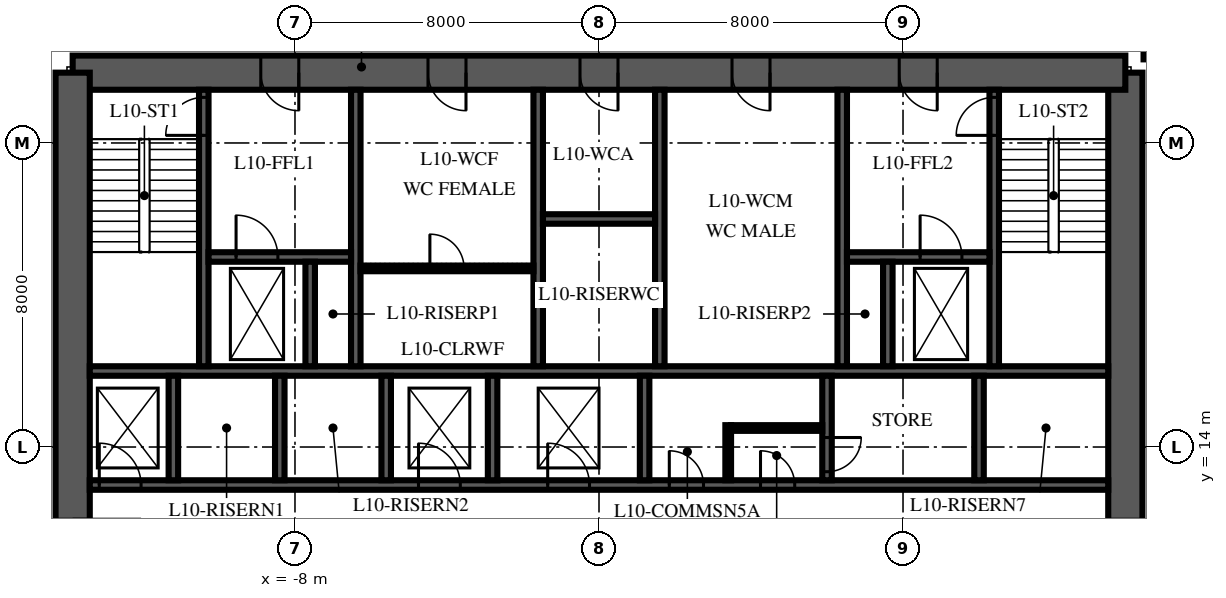
"""IFC4 building model, lengths in metres.
Left out: names, types, materials, properties, quantities, classifications, styles, units other than length and angle.
Written with IfcOpenShell. Run it as: python <this file> out.ifc"""

import sys

from ifc_helpers import new_model, si_unit, direction, frame, frame_2d, origin, place, context, subcontext, project, spatial, polyline, rectangle, outline, extrude, element, fill, save


model = new_model("IFC4")
c1 = context("Model", 3, precision=1e-05, world=origin(), true_north=direction((0.0, 1.0)))
c2 = subcontext(c1, "Body", "Model", "MODEL_VIEW")
j1 = project(units=[si_unit("LENGTHUNIT", "METRE"), si_unit("PLANEANGLEUNIT", "RADIAN")], contexts=[c1])
p1 = place(None, origin())
s1 = spatial("IfcSite", under=j1, at=p1, CompositionType="ELEMENT")
p2 = place(p1, origin())
s2 = spatial("IfcBuilding", under=s1, at=p2, CompositionType="ELEMENT")
p3 = place(p2, frame((0.0, 0.0, 52.0)))
s3 = spatial("IfcBuildingStorey", under=s2, at=p3, CompositionType="ELEMENT", Elevation=52.0)
p4 = place(p3, frame((13.85, 6.15, 0.0), z_axis=(0.0, 0.0, 1.0), x_axis=(0.0, 1.0, 0.0)))
e1 = element("IfcWall", 1, at=p4, inside=s3, PredefinedType="SHEAR", context=c2, shape_type="SweptSolid", body=[
    extrude(outline(polyline([(0.0, -0.45), (17.7, -0.45), (17.7, 0.0), (17.25, 0.0), (17.25, 0.45), (0.45, 0.45), (0.45, 0.0), (0.0, 0.0), (0.0, -0.45)])), origin(), (0.0, 0.0, 1.0), 4.0),
])
p5 = place(p4, frame((4.15, 0.0, 0.0)))
e2 = element("IfcOpeningElement", 2, at=p5, cuts=e1, PredefinedType="OPENING", context=c2, shape_type="SweptSolid", body=[
    extrude(rectangle(XDim=1.8, YDim=2.4, at=frame_2d((0.9, 1.2))), frame((0.0, 0.465, 0.0), z_axis=(0.0, -1.0, 0.0), x_axis=(1.0, 0.0, 0.0)), (0.0, 0.0, 1.0), 0.93),
])
p6 = place(p3, frame((13.85, 23.85, 0.0), z_axis=(0.0, 0.0, 1.0), x_axis=(-1.0, 0.0, 0.0)))
e3 = element("IfcWall", 3, at=p6, inside=s3, PredefinedType="SHEAR", context=c2, shape_type="SweptSolid", body=[
    extrude(rectangle(XDim=27.7, YDim=0.9, at=frame_2d((13.85, 0.0))), origin(), (0.0, 0.0, 1.0), 4.0),
])
p7 = place(p6, frame((21.75, 0.0, 0.0)))
e4 = element("IfcOpeningElement", 4, at=p7, cuts=e3, PredefinedType="OPENING", context=c2, shape_type="SweptSolid", body=[
    extrude(rectangle(XDim=1.0, YDim=2.1, at=frame_2d((0.5, 1.05))), frame((0.0, 0.465, 0.0), z_axis=(0.0, -1.0, 0.0), x_axis=(1.0, 0.0, 0.0)), (0.0, 0.0, 1.0), 0.93),
])
p8 = place(p6, frame((4.95, 0.0, 0.0)))
e5 = element("IfcOpeningElement", 5, at=p8, cuts=e3, PredefinedType="OPENING", context=c2, shape_type="SweptSolid", body=[
    extrude(rectangle(XDim=1.0, YDim=2.1, at=frame_2d((0.5, 1.05))), frame((0.0, 0.465, 0.0), z_axis=(0.0, -1.0, 0.0), x_axis=(1.0, 0.0, 0.0)), (0.0, 0.0, 1.0), 0.93),
])
p9 = place(p6, frame((17.35, 0.0, 0.0)))
e6 = element("IfcOpeningElement", 6, at=p9, cuts=e3, PredefinedType="OPENING", context=c2, shape_type="SweptSolid", body=[
    extrude(rectangle(XDim=1.0, YDim=2.1, at=frame_2d((0.5, 1.05))), frame((0.0, 0.465, 0.0), z_axis=(0.0, -1.0, 0.0), x_axis=(1.0, 0.0, 0.0)), (0.0, 0.0, 1.0), 0.93),
])
p10 = place(p6, frame((13.35, 0.0, 0.0)))
e7 = element("IfcOpeningElement", 7, at=p10, cuts=e3, PredefinedType="OPENING", context=c2, shape_type="SweptSolid", body=[
    extrude(rectangle(XDim=1.0, YDim=2.1, at=frame_2d((0.5, 1.05))), frame((0.0, 0.465, 0.0), z_axis=(0.0, -1.0, 0.0), x_axis=(1.0, 0.0, 0.0)), (0.0, 0.0, 1.0), 0.93),
])
p11 = place(p6, frame((9.35, 0.0, 0.0)))
e8 = element("IfcOpeningElement", 8, at=p11, cuts=e3, PredefinedType="OPENING", context=c2, shape_type="SweptSolid", body=[
    extrude(rectangle(XDim=1.0, YDim=2.1, at=frame_2d((0.5, 1.05))), frame((0.0, 0.465, 0.0), z_axis=(0.0, -1.0, 0.0), x_axis=(1.0, 0.0, 0.0)), (0.0, 0.0, 1.0), 0.93),
])
p12 = place(p3, frame((-13.85, 23.85, 0.0), z_axis=(0.0, 0.0, 1.0), x_axis=(0.0, -1.0, 0.0)))
e9 = element("IfcWall", 9, at=p12, inside=s3, PredefinedType="SHEAR", context=c2, shape_type="SweptSolid", body=[
    extrude(outline(polyline([(0.0, -0.45), (17.7, -0.45), (17.7, 0.0), (17.25, 0.0), (17.25, 0.45), (0.45, 0.45), (0.45, 0.0), (0.0, 0.0), (0.0, -0.45)])), origin(), (0.0, 0.0, 1.0), 4.0),
])
p13 = place(p12, frame((11.75, 0.0, 0.0)))
e10 = element("IfcOpeningElement", 10, at=p13, cuts=e9, PredefinedType="OPENING", context=c2, shape_type="SweptSolid", body=[
    extrude(rectangle(XDim=1.8, YDim=2.4, at=frame_2d((0.9, 1.2))), frame((0.0, 0.465, 0.0), z_axis=(0.0, -1.0, 0.0), x_axis=(1.0, 0.0, 0.0)), (0.0, 0.0, 1.0), 0.93),
])
p14 = place(p3, frame((-13.4, 13.0, 0.0), z_axis=(0.0, 0.0, 1.0), x_axis=(1.0, 0.0, 0.0)))
e11 = element("IfcWall", 11, at=p14, inside=s3, PredefinedType="SHEAR", context=c2, shape_type="SweptSolid", body=[
    extrude(rectangle(XDim=26.8, YDim=0.25, at=frame_2d((13.4, 0.0))), origin(), (0.0, 0.0, 1.0), 4.0),
])
p15 = place(p14, frame((0.25, 0.0, 0.0)))
e12 = element("IfcOpeningElement", 12, at=p15, cuts=e11, PredefinedType="OPENING", context=c2, shape_type="SweptSolid", body=[
    extrude(rectangle(XDim=1.1, YDim=2.1, at=frame_2d((0.55, 1.05))), frame((0.0, 0.14, 0.0), z_axis=(0.0, -1.0, 0.0), x_axis=(1.0, 0.0, 0.0)), (0.0, 0.0, 1.0), 0.28),
])
p16 = place(p14, frame((8.65, 0.0, 0.0)))
e13 = element("IfcOpeningElement", 13, at=p16, cuts=e11, PredefinedType="OPENING", context=c2, shape_type="SweptSolid", body=[
    extrude(rectangle(XDim=1.1, YDim=2.1, at=frame_2d((0.55, 1.05))), frame((0.0, 0.14, 0.0), z_axis=(0.0, -1.0, 0.0), x_axis=(1.0, 0.0, 0.0)), (0.0, 0.0, 1.0), 0.28),
])
p17 = place(p14, frame((12.05, 0.0, 0.0)))
e14 = element("IfcOpeningElement", 14, at=p17, cuts=e11, PredefinedType="OPENING", context=c2, shape_type="SweptSolid", body=[
    extrude(rectangle(XDim=1.1, YDim=2.1, at=frame_2d((0.55, 1.05))), frame((0.0, 0.14, 0.0), z_axis=(0.0, -1.0, 0.0), x_axis=(1.0, 0.0, 0.0)), (0.0, 0.0, 1.0), 0.28),
])
p18 = place(p14, frame((15.25, 0.0, 0.0)))
e15 = element("IfcOpeningElement", 15, at=p18, cuts=e11, PredefinedType="OPENING", context=c2, shape_type="SweptSolid", body=[
    extrude(rectangle(XDim=0.9, YDim=2.1, at=frame_2d((0.45, 1.05))), frame((0.0, 0.14, 0.0), z_axis=(0.0, -1.0, 0.0), x_axis=(1.0, 0.0, 0.0)), (0.0, 0.0, 1.0), 0.28),
])
p19 = place(p14, frame((17.65, 0.0, 0.0)))
e16 = element("IfcOpeningElement", 16, at=p19, cuts=e11, PredefinedType="OPENING", context=c2, shape_type="SweptSolid", body=[
    extrude(rectangle(XDim=0.9, YDim=2.1, at=frame_2d((0.45, 1.05))), frame((0.0, 0.14, 0.0), z_axis=(0.0, -1.0, 0.0), x_axis=(1.0, 0.0, 0.0)), (0.0, 0.0, 1.0), 0.28),
])
p20 = place(p3, frame((-13.4, 16.0, 0.0), z_axis=(0.0, 0.0, 1.0), x_axis=(1.0, 0.0, 0.0)))
e17 = element("IfcWall", 17, at=p20, inside=s3, PredefinedType="SHEAR", context=c2, shape_type="SweptSolid", body=[
    extrude(rectangle(XDim=26.8, YDim=0.25, at=frame_2d((13.4, 0.0))), origin(), (0.0, 0.0, 1.0), 4.0),
])
for number, where, z_axis, x_axis in (
    (18, (-11.2, 13.125, 0.0), (0.0, 0.0, 1.0), (0.0, 1.0, 0.0)),
    (19, (-8.4, 13.125, 0.0), (0.0, 0.0, 1.0), (0.0, 1.0, 0.0)),
    (20, (-5.6, 13.125, 0.0), (0.0, 0.0, 1.0), (0.0, 1.0, 0.0)),
    (21, (-2.8, 13.125, 0.0), (0.0, 0.0, 1.0), (0.0, 1.0, 0.0)),
    (22, (1.2, 13.125, 0.0), (0.0, 0.0, 1.0), (0.0, 1.0, 0.0)),
):
    element("IfcWall", number, at=place(p3, frame(where, z_axis=z_axis, x_axis=x_axis)), inside=s3, PredefinedType="SHEAR", context=c2, shape_type="SweptSolid", body=[
        extrude(rectangle(XDim=2.75, YDim=0.25, at=frame_2d((1.375, 0.0))), origin(), (0.0, 0.0, 1.0), 4.0),
    ])
p21 = place(p3, frame((6.0, 13.125, 0.0), z_axis=(0.0, 0.0, 1.0), x_axis=(0.0, 1.0, 0.0)))
e23 = element("IfcWall", 23, at=p21, inside=s3, PredefinedType="SHEAR", context=c2, shape_type="SweptSolid", body=[
    extrude(rectangle(XDim=2.75, YDim=0.25, at=frame_2d((1.375, 0.0))), origin(), (0.0, 0.0, 1.0), 4.0),
])
p22 = place(p21, frame((0.225, 0.0, 0.0)))
e24 = element("IfcOpeningElement", 24, at=p22, cuts=e23, PredefinedType="OPENING", context=c2, shape_type="SweptSolid", body=[
    extrude(rectangle(XDim=0.9, YDim=2.1, at=frame_2d((0.45, 1.05))), frame((0.0, 0.14, 0.0), z_axis=(0.0, -1.0, 0.0), x_axis=(1.0, 0.0, 0.0)), (0.0, 0.0, 1.0), 0.28),
])
p23 = place(p3, frame((10.0, 13.125, 0.0), z_axis=(0.0, 0.0, 1.0), x_axis=(0.0, 1.0, 0.0)))
e25 = element("IfcWall", 25, at=p23, inside=s3, PredefinedType="SHEAR", context=c2, shape_type="SweptSolid", body=[
    extrude(rectangle(XDim=2.75, YDim=0.25, at=frame_2d((1.375, 0.0))), origin(), (0.0, 0.0, 1.0), 4.0),
])
p24 = place(p3, frame((-10.4, 16.125, 0.0), z_axis=(0.0, 0.0, 1.0), x_axis=(0.0, 1.0, 0.0)))
e26 = element("IfcWall", 26, at=p24, inside=s3, PredefinedType="SHEAR", context=c2, shape_type="SweptSolid", body=[
    extrude(rectangle(XDim=7.275, YDim=0.25, at=frame_2d((3.637, 0.0))), origin(), (0.0, 0.0, 1.0), 4.0),
])
p25 = place(p24, frame((6.075, 0.0, 0.0)))
e27 = element("IfcOpeningElement", 27, at=p25, cuts=e26, PredefinedType="OPENING", context=c2, shape_type="SweptSolid", body=[
    extrude(rectangle(XDim=1.0, YDim=2.1, at=frame_2d((0.5, 1.05))), frame((0.0, 0.14, 0.0), z_axis=(0.0, -1.0, 0.0), x_axis=(1.0, 0.0, 0.0)), (0.0, 0.0, 1.0), 0.28),
])
for number, where, z_axis, x_axis in (
    (28, (-6.4, 16.125, 0.0), (0.0, 0.0, 1.0), (0.0, 1.0, 0.0)),
    (29, (-1.6, 16.125, 0.0), (0.0, 0.0, 1.0), (0.0, 1.0, 0.0)),
    (30, (1.6, 16.125, 0.0), (0.0, 0.0, 1.0), (0.0, 1.0, 0.0)),
    (31, (6.4, 16.125, 0.0), (0.0, 0.0, 1.0), (0.0, 1.0, 0.0)),
):
    element("IfcWall", number, at=place(p3, frame(where, z_axis=z_axis, x_axis=x_axis)), inside=s3, PredefinedType="SHEAR", context=c2, shape_type="SweptSolid", body=[
        extrude(rectangle(XDim=7.275, YDim=0.25, at=frame_2d((3.637, 0.0))), origin(), (0.0, 0.0, 1.0), 4.0),
    ])
p26 = place(p3, frame((10.4, 16.125, 0.0), z_axis=(0.0, 0.0, 1.0), x_axis=(0.0, 1.0, 0.0)))
e32 = element("IfcWall", 32, at=p26, inside=s3, PredefinedType="SHEAR", context=c2, shape_type="SweptSolid", body=[
    extrude(rectangle(XDim=7.275, YDim=0.25, at=frame_2d((3.637, 0.0))), origin(), (0.0, 0.0, 1.0), 4.0),
])
p27 = place(p26, frame((6.075, 0.0, 0.0)))
e33 = element("IfcOpeningElement", 33, at=p27, cuts=e32, PredefinedType="OPENING", context=c2, shape_type="SweptSolid", body=[
    extrude(rectangle(XDim=1.0, YDim=2.1, at=frame_2d((0.5, 1.05))), frame((0.0, 0.14, 0.0), z_axis=(0.0, -1.0, 0.0), x_axis=(1.0, 0.0, 0.0)), (0.0, 0.0, 1.0), 0.28),
])
p28 = place(p3, frame((-10.275, 19.0, 0.0), z_axis=(0.0, 0.0, 1.0), x_axis=(1.0, 0.0, 0.0)))
e34 = element("IfcWall", 34, at=p28, inside=s3, PredefinedType="SHEAR", context=c2, shape_type="SweptSolid", body=[
    extrude(rectangle(XDim=3.75, YDim=0.25, at=frame_2d((1.875, 0.0))), origin(), (0.0, 0.0, 1.0), 4.0),
])
p29 = place(p28, frame((0.725, 0.0, 0.0)))
e35 = element("IfcOpeningElement", 35, at=p29, cuts=e34, PredefinedType="OPENING", context=c2, shape_type="SweptSolid", body=[
    extrude(rectangle(XDim=1.1, YDim=2.1, at=frame_2d((0.55, 1.05))), frame((0.0, 0.14, 0.0), z_axis=(0.0, -1.0, 0.0), x_axis=(1.0, 0.0, 0.0)), (0.0, 0.0, 1.0), 0.28),
])
p30 = place(p3, frame((6.525, 19.0, 0.0), z_axis=(0.0, 0.0, 1.0), x_axis=(1.0, 0.0, 0.0)))
e36 = element("IfcWall", 36, at=p30, inside=s3, PredefinedType="SHEAR", context=c2, shape_type="SweptSolid", body=[
    extrude(rectangle(XDim=3.75, YDim=0.25, at=frame_2d((1.875, 0.0))), origin(), (0.0, 0.0, 1.0), 4.0),
])
p31 = place(p30, frame((1.925, 0.0, 0.0)))
e37 = element("IfcOpeningElement", 37, at=p31, cuts=e36, PredefinedType="OPENING", context=c2, shape_type="SweptSolid", body=[
    extrude(rectangle(XDim=1.1, YDim=2.1, at=frame_2d((0.55, 1.05))), frame((0.0, 0.14, 0.0), z_axis=(0.0, -1.0, 0.0), x_axis=(1.0, 0.0, 0.0)), (0.0, 0.0, 1.0), 0.28),
])
for number, where, z_axis, x_axis in (
    (38, (-7.6, 16.125, 0.0), (0.0, 0.0, 1.0), (0.0, 1.0, 0.0)),
    (39, (7.6, 16.125, 0.0), (0.0, 0.0, 1.0), (0.0, 1.0, 0.0)),
):
    element("IfcWall", number, at=place(p3, frame(where, z_axis=z_axis, x_axis=x_axis)), inside=s3, PredefinedType="SHEAR", context=c2, shape_type="SweptSolid", body=[
        extrude(rectangle(XDim=2.75, YDim=0.25, at=frame_2d((1.375, 0.0))), origin(), (0.0, 0.0, 1.0), 4.0),
    ])
p32 = place(p3, frame((-1.475, 20.0, 0.0), z_axis=(0.0, 0.0, 1.0), x_axis=(1.0, 0.0, 0.0)))
e40 = element("IfcWall", 40, at=p32, inside=s3, PredefinedType="SHEAR", context=c2, shape_type="SweptSolid", body=[
    extrude(rectangle(XDim=2.95, YDim=0.25, at=frame_2d((1.475, 0.0))), origin(), (0.0, 0.0, 1.0), 4.0),
])
p33 = place(p3, frame((-6.275, 18.7, 0.0), z_axis=(0.0, 0.0, 1.0), x_axis=(1.0, 0.0, 0.0)))
e41 = element("IfcWall", 41, at=p33, inside=s3, PredefinedType="PARTITIONING", context=c2, shape_type="SweptSolid", body=[
    extrude(rectangle(XDim=4.55, YDim=0.15, at=frame_2d((2.275, 0.0))), origin(), (0.0, 0.0, 1.0), 3.85),
])
p34 = place(p33, frame((1.825, 0.0, 0.0)))
e42 = element("IfcOpeningElement", 42, at=p34, cuts=e41, PredefinedType="OPENING", context=c2, shape_type="SweptSolid", body=[
    extrude(rectangle(XDim=0.9, YDim=2.1, at=frame_2d((0.45, 1.05))), frame((0.0, 0.09, 0.0), z_axis=(0.0, -1.0, 0.0), x_axis=(1.0, 0.0, 0.0)), (0.0, 0.0, 1.0), 0.18),
])
p35 = place(p3, frame((3.4, 13.125, 0.0), z_axis=(0.0, 0.0, 1.0), x_axis=(0.0, 1.0, 0.0)))
e43 = element("IfcWall", 43, at=p35, inside=s3, PredefinedType="PARTITIONING", context=c2, shape_type="SweptSolid", body=[
    extrude(rectangle(XDim=1.45, YDim=0.15, at=frame_2d((0.725, 0.0))), origin(), (0.0, 0.0, 1.0), 3.85),
])
p36 = place(p3, frame((3.475, 14.5, 0.0), z_axis=(0.0, 0.0, 1.0), x_axis=(1.0, 0.0, 0.0)))
e44 = element("IfcWall", 44, at=p36, inside=s3, PredefinedType="PARTITIONING", context=c2, shape_type="SweptSolid", body=[
    extrude(rectangle(XDim=2.4, YDim=0.15, at=frame_2d((1.2, 0.0))), origin(), (0.0, 0.0, 1.0), 3.85),
])
p37 = place(p3, frame((14.33, 24.3, 0.0), z_axis=(0.0, 0.0, 1.0), x_axis=(1.0, 0.0, 0.0)))
e45 = element("IfcWall", 45, at=p37, inside=s3, PredefinedType="PARTITIONING", context=c2, shape_type="SweptSolid", body=[
    extrude(rectangle(XDim=1.82, YDim=0.2, at=frame_2d((0.91, 0.0))), origin(), (0.0, 0.0, 1.0), 3.4),
])
p38 = place(p7, origin())
e46 = element("IfcDoor", 46, at=p38, inside=s3, OperationType="SINGLE_SWING_RIGHT", PredefinedType="DOOR", context=c2, shape_type="SweptSolid", body=[
    extrude(rectangle(XDim=1.0, YDim=2.1, at=frame_2d((0.5, 1.05))), frame((0.0, 0.45, 0.0), z_axis=(0.0, -1.0, 0.0), x_axis=(1.0, 0.0, 0.0)), (0.0, 0.0, 1.0), 0.899),
])
fill(e4, e46)
p39 = place(p8, origin())
e47 = element("IfcDoor", 47, at=p39, inside=s3, OperationType="SINGLE_SWING_RIGHT", PredefinedType="DOOR", context=c2, shape_type="SweptSolid", body=[
    extrude(rectangle(XDim=1.0, YDim=2.1, at=frame_2d((0.5, 1.05))), frame((0.0, 0.45, 0.0), z_axis=(0.0, -1.0, 0.0), x_axis=(1.0, 0.0, 0.0)), (0.0, 0.0, 1.0), 0.899),
])
fill(e5, e47)
p40 = place(p9, origin())
e48 = element("IfcDoor", 48, at=p40, inside=s3, OperationType="SINGLE_SWING_LEFT", PredefinedType="DOOR", context=c2, shape_type="SweptSolid", body=[
    extrude(rectangle(XDim=1.0, YDim=2.1, at=frame_2d((0.5, 1.05))), frame((0.0, 0.45, 0.0), z_axis=(0.0, -1.0, 0.0), x_axis=(1.0, 0.0, 0.0)), (0.0, 0.0, 1.0), 0.899),
])
fill(e6, e48)
p41 = place(p10, origin())
e49 = element("IfcDoor", 49, at=p41, inside=s3, OperationType="SINGLE_SWING_LEFT", PredefinedType="DOOR", context=c2, shape_type="SweptSolid", body=[
    extrude(rectangle(XDim=1.0, YDim=2.1, at=frame_2d((0.5, 1.05))), frame((0.0, 0.45, 0.0), z_axis=(0.0, -1.0, 0.0), x_axis=(1.0, 0.0, 0.0)), (0.0, 0.0, 1.0), 0.899),
])
fill(e7, e49)
p42 = place(p11, origin())
e50 = element("IfcDoor", 50, at=p42, inside=s3, OperationType="SINGLE_SWING_LEFT", PredefinedType="DOOR", context=c2, shape_type="SweptSolid", body=[
    extrude(rectangle(XDim=1.0, YDim=2.1, at=frame_2d((0.5, 1.05))), frame((0.0, 0.45, 0.0), z_axis=(0.0, -1.0, 0.0), x_axis=(1.0, 0.0, 0.0)), (0.0, 0.0, 1.0), 0.899),
])
fill(e8, e50)
p43 = place(p25, origin())
e51 = element("IfcDoor", 51, at=p43, inside=s3, OperationType="SINGLE_SWING_LEFT", PredefinedType="DOOR", context=c2, shape_type="SweptSolid", body=[
    extrude(rectangle(XDim=1.0, YDim=2.1, at=frame_2d((0.5, 1.05))), frame((0.0, 0.125, 0.0), z_axis=(0.0, -1.0, 0.0), x_axis=(1.0, 0.0, 0.0)), (0.0, 0.0, 1.0), 0.25),
])
fill(e27, e51)
p44 = place(p27, origin())
e52 = element("IfcDoor", 52, at=p44, inside=s3, OperationType="SINGLE_SWING_LEFT", PredefinedType="DOOR", context=c2, shape_type="SweptSolid", body=[
    extrude(rectangle(XDim=1.0, YDim=2.1, at=frame_2d((0.5, 1.05))), frame((0.0, 0.125, 0.0), z_axis=(0.0, -1.0, 0.0), x_axis=(1.0, 0.0, 0.0)), (0.0, 0.0, 1.0), 0.25),
])
fill(e33, e52)
p45 = place(p15, origin())
e53 = element("IfcDoor", 53, at=p45, inside=s3, OperationType="SLIDING_TO_LEFT", PredefinedType="DOOR", context=c2, shape_type="SweptSolid", body=[
    extrude(rectangle(XDim=1.1, YDim=2.1, at=frame_2d((0.55, 1.05))), frame((0.0, 0.125, 0.0), z_axis=(0.0, -1.0, 0.0), x_axis=(1.0, 0.0, 0.0)), (0.0, 0.0, 1.0), 0.25),
])
fill(e12, e53)
p46 = place(p16, origin())
e54 = element("IfcDoor", 54, at=p46, inside=s3, OperationType="SLIDING_TO_LEFT", PredefinedType="DOOR", context=c2, shape_type="SweptSolid", body=[
    extrude(rectangle(XDim=1.1, YDim=2.1, at=frame_2d((0.55, 1.05))), frame((0.0, 0.125, 0.0), z_axis=(0.0, -1.0, 0.0), x_axis=(1.0, 0.0, 0.0)), (0.0, 0.0, 1.0), 0.25),
])
fill(e13, e54)
p47 = place(p17, origin())
e55 = element("IfcDoor", 55, at=p47, inside=s3, OperationType="SLIDING_TO_LEFT", PredefinedType="DOOR", context=c2, shape_type="SweptSolid", body=[
    extrude(rectangle(XDim=1.1, YDim=2.1, at=frame_2d((0.55, 1.05))), frame((0.0, 0.125, 0.0), z_axis=(0.0, -1.0, 0.0), x_axis=(1.0, 0.0, 0.0)), (0.0, 0.0, 1.0), 0.25),
])
fill(e14, e55)
p48 = place(p31, origin())
e56 = element("IfcDoor", 56, at=p48, inside=s3, OperationType="SLIDING_TO_RIGHT", PredefinedType="DOOR", context=c2, shape_type="SweptSolid", body=[
    extrude(rectangle(XDim=1.1, YDim=2.1, at=frame_2d((0.55, 1.05))), frame((0.0, 0.125, 0.0), z_axis=(0.0, -1.0, 0.0), x_axis=(1.0, 0.0, 0.0)), (0.0, 0.0, 1.0), 0.25),
])
fill(e37, e56)
p49 = place(p29, origin())
e57 = element("IfcDoor", 57, at=p49, inside=s3, OperationType="SLIDING_TO_RIGHT", PredefinedType="DOOR", context=c2, shape_type="SweptSolid", body=[
    extrude(rectangle(XDim=1.1, YDim=2.1, at=frame_2d((0.55, 1.05))), frame((0.0, 0.125, 0.0), z_axis=(0.0, -1.0, 0.0), x_axis=(1.0, 0.0, 0.0)), (0.0, 0.0, 1.0), 0.25),
])
fill(e35, e57)
p50 = place(p18, origin())
e58 = element("IfcDoor", 58, at=p50, inside=s3, OperationType="SINGLE_SWING_LEFT", PredefinedType="DOOR", context=c2, shape_type="SweptSolid", body=[
    extrude(rectangle(XDim=0.9, YDim=2.1, at=frame_2d((0.45, 1.05))), frame((0.0, 0.125, 0.0), z_axis=(0.0, -1.0, 0.0), x_axis=(1.0, 0.0, 0.0)), (0.0, 0.0, 1.0), 0.25),
])
fill(e15, e58)
p51 = place(p19, origin())
e59 = element("IfcDoor", 59, at=p51, inside=s3, OperationType="SINGLE_SWING_LEFT", PredefinedType="DOOR", context=c2, shape_type="SweptSolid", body=[
    extrude(rectangle(XDim=0.9, YDim=2.1, at=frame_2d((0.45, 1.05))), frame((0.0, 0.125, 0.0), z_axis=(0.0, -1.0, 0.0), x_axis=(1.0, 0.0, 0.0)), (0.0, 0.0, 1.0), 0.25),
])
fill(e16, e59)
p52 = place(p22, frame((0.9, 0.0, 0.0), z_axis=(0.0, 0.0, 1.0), x_axis=(-1.0, 0.0, 0.0)))
e60 = element("IfcDoor", 60, at=p52, inside=s3, OperationType="SINGLE_SWING_LEFT", PredefinedType="DOOR", context=c2, shape_type="SweptSolid", body=[
    extrude(rectangle(XDim=0.9, YDim=2.1, at=frame_2d((0.45, 1.05))), frame((0.0, 0.125, 0.0), z_axis=(0.0, -1.0, 0.0), x_axis=(1.0, 0.0, 0.0)), (0.0, 0.0, 1.0), 0.25),
])
fill(e24, e60)
p53 = place(p34, origin())
e61 = element("IfcDoor", 61, at=p53, inside=s3, OperationType="SINGLE_SWING_LEFT", PredefinedType="DOOR", context=c2, shape_type="SweptSolid", body=[
    extrude(rectangle(XDim=0.9, YDim=2.1, at=frame_2d((0.45, 1.05))), frame((0.0, 0.075, 0.0), z_axis=(0.0, -1.0, 0.0), x_axis=(1.0, 0.0, 0.0)), (0.0, 0.0, 1.0), 0.149),
])
fill(e42, e61)
save(model, sys.argv[1])
